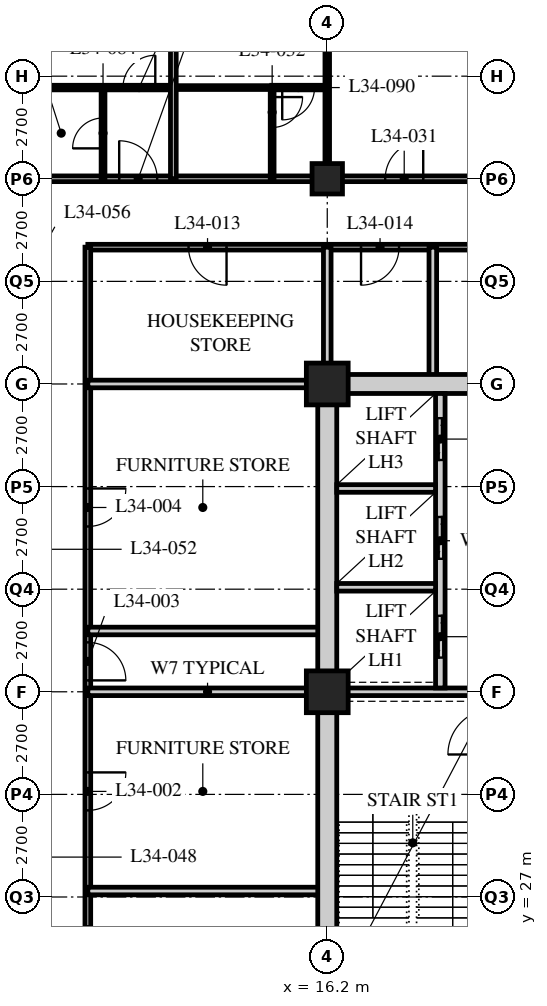
"""IFC4 building model, lengths in metres.
Left out: names, types, materials, properties, quantities, classifications, styles, units other than length and angle.
Written with IfcOpenShell. Run it as: python <this file> out.ifc"""

import sys

from ifc_helpers import new_model, si_unit, direction, frame, frame_2d, origin, origin_2d, place, context, subcontext, project, spatial, rectangle, hollow_rectangle, extrude, element, fill, save


model = new_model("IFC4")
c1 = context("Model", 3, precision=1e-05, world=origin(), true_north=direction((0.0, 1.0)))
c2 = subcontext(c1, "Body", "Model", "MODEL_VIEW")
j1 = project(units=[si_unit("LENGTHUNIT", "METRE"), si_unit("PLANEANGLEUNIT", "RADIAN")], contexts=[c1])
p1 = place(None, origin())
s1 = spatial("IfcSite", under=j1, at=p1, CompositionType="ELEMENT")
p2 = place(p1, origin())
s2 = spatial("IfcBuilding", under=s1, at=p2, CompositionType="ELEMENT")
p3 = place(p2, frame((0.0, 0.0, 134.0)))
s3 = spatial("IfcBuildingStorey", under=s2, at=p3, CompositionType="ELEMENT", Elevation=134.0)
for number, where, z_axis, x_axis in (
    (1, (16.2, 32.4, 0.0), (0.0, 0.0, 1.0), (1.0, 0.0, 0.0)),
    (2, (16.2, 40.5, 0.0), (0.0, 0.0, 1.0), (1.0, 0.0, 0.0)),
):
    element("IfcColumn", number, at=place(p3, frame(where, z_axis=z_axis, x_axis=x_axis)), inside=s3, PredefinedType="COLUMN", context=c2, shape_type="SweptSolid", body=[
        extrude(hollow_rectangle(XDim=1.1, YDim=1.1, WallThickness=0.1, at=origin_2d()), origin(), (0.0, 0.0, 1.0), 3.4),
    ])
p4 = place(p3, frame((16.2, 45.9, 0.0), z_axis=(0.0, 0.0, 1.0), x_axis=(1.0, 0.0, 0.0)))
e3 = element("IfcColumn", 3, at=p4, inside=s3, PredefinedType="COLUMN", context=c2, shape_type="SweptSolid", body=[
    extrude(hollow_rectangle(XDim=0.8, YDim=0.8, WallThickness=0.08, at=origin_2d()), origin(), (0.0, 0.0, 1.0), 3.4),
])
p5 = place(p3, frame((8.1, 45.9, 0.0), z_axis=(0.0, 0.0, 1.0), x_axis=(1.0, 0.0, 0.0)))
e4 = element("IfcWall", 4, at=p5, inside=s3, PredefinedType="PARTITIONING", context=c2, shape_type="SweptSolid", body=[
    extrude(rectangle(XDim=36.45, YDim=0.15, at=frame_2d((18.225, 0.0))), origin(), (0.0, 0.0, 1.0), 2.578),
])
p6 = place(p5, frame((9.625, 0.0, 0.0)))
e5 = element("IfcOpeningElement", 5, at=p6, cuts=e4, PredefinedType="OPENING", context=c2, shape_type="SweptSolid", body=[
    extrude(rectangle(XDim=1.0, YDim=2.1, at=frame_2d((0.5, 1.05))), frame((0.0, 0.085, 0.0), z_axis=(0.0, -1.0, 0.0), x_axis=(1.0, 0.0, 0.0)), (0.0, 0.0, 1.0), 0.17),
])
p7 = place(p5, frame((21.775, 0.0, 0.0)))
e6 = element("IfcOpeningElement", 6, at=p7, cuts=e4, PredefinedType="OPENING", context=c2, shape_type="SweptSolid", body=[
    extrude(rectangle(XDim=1.0, YDim=2.1, at=frame_2d((0.5, 1.05))), frame((0.0, 0.085, 0.0), z_axis=(0.0, -1.0, 0.0), x_axis=(1.0, 0.0, 0.0)), (0.0, 0.0, 1.0), 0.17),
])
p8 = place(p5, frame((28.95, 0.0, 0.0)))
e7 = element("IfcOpeningElement", 7, at=p8, cuts=e4, PredefinedType="OPENING", context=c2, shape_type="SweptSolid", body=[
    extrude(rectangle(XDim=1.0, YDim=2.1, at=frame_2d((0.5, 1.05))), frame((0.0, 0.085, 0.0), z_axis=(0.0, -1.0, 0.0), x_axis=(1.0, 0.0, 0.0)), (0.0, 0.0, 1.0), 0.17),
])
p9 = place(p5, frame((33.925, 0.0, 0.0)))
e8 = element("IfcOpeningElement", 8, at=p9, cuts=e4, PredefinedType="OPENING", context=c2, shape_type="SweptSolid", body=[
    extrude(rectangle(XDim=1.0, YDim=2.1, at=frame_2d((0.5, 1.05))), frame((0.0, 0.085, 0.0), z_axis=(0.0, -1.0, 0.0), x_axis=(1.0, 0.0, 0.0)), (0.0, 0.0, 1.0), 0.17),
])
p10 = place(p5, frame((2.625, 0.0, 0.0)))
e9 = element("IfcOpeningElement", 9, at=p10, cuts=e4, PredefinedType="OPENING", context=c2, shape_type="SweptSolid", body=[
    extrude(rectangle(XDim=1.0, YDim=2.1, at=frame_2d((0.5, 1.05))), frame((0.0, 0.085, 0.0), z_axis=(0.0, -1.0, 0.0), x_axis=(1.0, 0.0, 0.0)), (0.0, 0.0, 1.0), 0.17),
])
p11 = place(p3, frame((27.14, 44.1, 0.0), z_axis=(0.0, 0.0, 1.0), x_axis=(-1.0, 0.0, 0.0)))
e10 = element("IfcWall", 10, at=p11, inside=s3, PredefinedType="PARTITIONING", context=c2, shape_type="SweptSolid", body=[
    extrude(rectangle(XDim=17.24, YDim=0.15, at=frame_2d((8.62, 0.0))), origin(), (0.0, 0.0, 1.0), 3.19),
])
p12 = place(p11, frame((13.59, 0.0, 0.0)))
e11 = element("IfcOpeningElement", 11, at=p12, cuts=e10, PredefinedType="OPENING", context=c2, shape_type="SweptSolid", body=[
    extrude(rectangle(XDim=1.0, YDim=2.1, at=frame_2d((0.5, 1.05))), frame((0.0, 0.085, 0.0), z_axis=(0.0, -1.0, 0.0), x_axis=(1.0, 0.0, 0.0)), (0.0, 0.0, 1.0), 0.17),
])
p13 = place(p11, frame((9.051, 0.0, 0.0)))
e12 = element("IfcOpeningElement", 12, at=p13, cuts=e10, PredefinedType="OPENING", context=c2, shape_type="SweptSolid", body=[
    extrude(rectangle(XDim=1.0, YDim=2.1, at=frame_2d((0.5, 1.05))), frame((0.0, 0.085, 0.0), z_axis=(0.0, -1.0, 0.0), x_axis=(1.0, 0.0, 0.0)), (0.0, 0.0, 1.0), 0.17),
])
p14 = place(p11, frame((3.576, 0.0, 0.0)))
e13 = element("IfcOpeningElement", 13, at=p14, cuts=e10, PredefinedType="OPENING", context=c2, shape_type="SweptSolid", body=[
    extrude(rectangle(XDim=1.0, YDim=2.1, at=frame_2d((0.5, 1.05))), frame((0.0, 0.085, 0.0), z_axis=(0.0, -1.0, 0.0), x_axis=(1.0, 0.0, 0.0)), (0.0, 0.0, 1.0), 0.17),
])
p15 = place(p3, frame((9.9, 44.1, 0.0), z_axis=(0.0, 0.0, 1.0), x_axis=(0.0, -1.0, 0.0)))
e14 = element("IfcWall", 14, at=p15, inside=s3, PredefinedType="PARTITIONING", context=c2, shape_type="SweptSolid", body=[
    extrude(rectangle(XDim=24.75, YDim=0.15, at=frame_2d((12.375, 0.0))), origin(), (0.0, 0.0, 1.0), 3.19),
])
p16 = place(p15, frame((17.871, 0.0, 0.0)))
e15 = element("IfcOpeningElement", 15, at=p16, cuts=e14, PredefinedType="OPENING", context=c2, shape_type="SweptSolid", body=[
    extrude(rectangle(XDim=1.0, YDim=2.1, at=frame_2d((0.5, 1.05))), frame((0.0, 0.085, 0.0), z_axis=(0.0, -1.0, 0.0), x_axis=(1.0, 0.0, 0.0)), (0.0, 0.0, 1.0), 0.17),
])
p17 = place(p15, frame((13.821, 0.0, 0.0)))
e16 = element("IfcOpeningElement", 16, at=p17, cuts=e14, PredefinedType="OPENING", context=c2, shape_type="SweptSolid", body=[
    extrude(rectangle(XDim=1.0, YDim=2.1, at=frame_2d((0.5, 1.05))), frame((0.0, 0.085, 0.0), z_axis=(0.0, -1.0, 0.0), x_axis=(1.0, 0.0, 0.0)), (0.0, 0.0, 1.0), 0.17),
])
p18 = place(p15, frame((10.4, 0.0, 0.0)))
e17 = element("IfcOpeningElement", 17, at=p18, cuts=e14, PredefinedType="OPENING", context=c2, shape_type="SweptSolid", body=[
    extrude(rectangle(XDim=1.0, YDim=2.1, at=frame_2d((0.5, 1.05))), frame((0.0, 0.085, 0.0), z_axis=(0.0, -1.0, 0.0), x_axis=(1.0, 0.0, 0.0)), (0.0, 0.0, 1.0), 0.17),
])
p19 = place(p15, frame((6.35, 0.0, 0.0)))
e18 = element("IfcOpeningElement", 18, at=p19, cuts=e14, PredefinedType="OPENING", context=c2, shape_type="SweptSolid", body=[
    extrude(rectangle(XDim=1.0, YDim=2.1, at=frame_2d((0.5, 1.05))), frame((0.0, 0.085, 0.0), z_axis=(0.0, -1.0, 0.0), x_axis=(1.0, 0.0, 0.0)), (0.0, 0.0, 1.0), 0.17),
])
for number, where, z_axis, x_axis in (
    (19, (9.9, 32.4, 0.0), (0.0, 0.0, 1.0), (1.0, 0.0, 0.0)),
    (20, (9.9, 27.157, 0.0), (0.0, 0.0, 1.0), (1.0, 0.0, 0.0)),
    (21, (9.9, 34.0, 0.0), (0.0, 0.0, 1.0), (1.0, 0.0, 0.0)),
):
    element("IfcWall", number, at=place(p3, frame(where, z_axis=z_axis, x_axis=x_axis)), inside=s3, PredefinedType="SOLIDWALL", context=c2, shape_type="SweptSolid", body=[
        extrude(rectangle(XDim=6.3, YDim=0.2, at=frame_2d((3.15, 0.0))), origin(), (0.0, 0.0, 1.0), 3.19),
    ])
p20 = place(p3, frame((16.2, 40.5, 0.0), z_axis=(0.0, 0.0, 1.0), x_axis=(0.0, 1.0, 0.0)))
e22 = element("IfcWall", 22, at=p20, inside=s3, PredefinedType="SOLIDWALL", context=c2, shape_type="SweptSolid", body=[
    extrude(rectangle(XDim=3.6, YDim=0.2, at=frame_2d((1.8, 0.0))), origin(), (0.0, 0.0, 1.0), 2.578),
])
p21 = place(p3, frame((18.978, 44.1, 0.0), z_axis=(0.0, 0.0, 1.0), x_axis=(0.0, -1.0, 0.0)))
e23 = element("IfcWall", 23, at=p21, inside=s3, PredefinedType="SOLIDWALL", context=c2, shape_type="SweptSolid", body=[
    extrude(rectangle(XDim=3.6, YDim=0.2, at=frame_2d((1.8, 0.0))), origin(), (0.0, 0.0, 1.0), 3.19),
])
p22 = place(p3, frame((9.9, 40.5, 0.0), z_axis=(0.0, 0.0, 1.0), x_axis=(1.0, 0.0, 0.0)))
e24 = element("IfcWall", 24, at=p22, inside=s3, PredefinedType="SOLIDWALL", context=c2, shape_type="SweptSolid", body=[
    extrude(rectangle(XDim=6.3, YDim=0.2, at=frame_2d((3.15, 0.0))), origin(), (0.0, 0.0, 1.0), 3.19),
])
p23 = place(p3, frame((12.15, 48.3, 0.0), z_axis=(0.0, 0.0, 1.0), x_axis=(1.0, 0.0, 0.0)))
e25 = element("IfcWall", 25, at=p23, inside=s3, PredefinedType="PARTITIONING", context=c2, shape_type="SweptSolid", body=[
    extrude(rectangle(XDim=2.6, YDim=0.1, at=frame_2d((1.3, 0.0))), origin(), (0.0, 0.0, 1.0), 3.19),
])
p24 = place(p3, frame((14.75, 45.9, 0.0), z_axis=(0.0, 0.0, 1.0), x_axis=(0.0, 1.0, 0.0)))
e26 = element("IfcWall", 26, at=p24, inside=s3, PredefinedType="PARTITIONING", context=c2, shape_type="SweptSolid", body=[
    extrude(rectangle(XDim=2.4, YDim=0.1, at=frame_2d((1.2, 0.0))), origin(), (0.0, 0.0, 1.0), 3.19),
])
p25 = place(p24, frame((1.35, 0.0, 0.0)))
e27 = element("IfcOpeningElement", 27, at=p25, cuts=e26, PredefinedType="OPENING", context=c2, shape_type="SweptSolid", body=[
    extrude(rectangle(XDim=0.8, YDim=2.1, at=frame_2d((0.4, 1.05))), frame((0.0, 0.06, 0.0), z_axis=(0.0, -1.0, 0.0), x_axis=(1.0, 0.0, 0.0)), (0.0, 0.0, 1.0), 0.12),
])
p26 = place(p3, frame((16.2, 45.9, 0.0), z_axis=(0.0, 0.0, 1.0), x_axis=(0.0, 1.0, 0.0)))
e28 = element("IfcWall", 28, at=p26, inside=s3, PredefinedType="PARTITIONING", context=c2, shape_type="SweptSolid", body=[
    extrude(rectangle(XDim=7.8, YDim=0.12, at=frame_2d((3.9, 0.0))), origin(), (0.0, 0.0, 1.0), 2.578),
])
p27 = place(p26, frame((4.825, 0.0, 0.0)))
e29 = element("IfcOpeningElement", 29, at=p27, cuts=e28, PredefinedType="OPENING", context=c2, shape_type="SweptSolid", body=[
    extrude(rectangle(XDim=0.85, YDim=2.1, at=frame_2d((0.425, 1.05))), frame((0.0, 0.07, 0.0), z_axis=(0.0, -1.0, 0.0), x_axis=(1.0, 0.0, 0.0)), (0.0, 0.0, 1.0), 0.14),
])
p28 = place(p3, frame((8.1, 48.3, 0.0), z_axis=(0.0, 0.0, 1.0), x_axis=(1.0, 0.0, 0.0)))
e30 = element("IfcWall", 30, at=p28, inside=s3, PredefinedType="PARTITIONING", context=c2, shape_type="SweptSolid", body=[
    extrude(rectangle(XDim=4.05, YDim=0.12, at=frame_2d((2.025, 0.0))), origin(), (0.0, 0.0, 1.0), 3.19),
])
p29 = place(p28, frame((2.725, 0.0, 0.0)))
e31 = element("IfcOpeningElement", 31, at=p29, cuts=e30, PredefinedType="OPENING", context=c2, shape_type="SweptSolid", body=[
    extrude(rectangle(XDim=0.85, YDim=2.1, at=frame_2d((0.425, 1.05))), frame((0.0, 0.07, 0.0), z_axis=(0.0, -1.0, 0.0), x_axis=(1.0, 0.0, 0.0)), (0.0, 0.0, 1.0), 0.14),
])
p30 = place(p3, frame((10.3, 45.9, 0.0), z_axis=(0.0, 0.0, 1.0), x_axis=(0.0, 1.0, 0.0)))
e32 = element("IfcWall", 32, at=p30, inside=s3, PredefinedType="PARTITIONING", context=c2, shape_type="SweptSolid", body=[
    extrude(rectangle(XDim=2.4, YDim=0.1, at=frame_2d((1.2, 0.0))), origin(), (0.0, 0.0, 1.0), 3.19),
])
p31 = place(p30, frame((0.8, 0.0, 0.0)))
e33 = element("IfcOpeningElement", 33, at=p31, cuts=e32, PredefinedType="OPENING", context=c2, shape_type="SweptSolid", body=[
    extrude(rectangle(XDim=0.8, YDim=2.1, at=frame_2d((0.4, 1.05))), frame((0.0, 0.06, 0.0), z_axis=(0.0, -1.0, 0.0), x_axis=(1.0, 0.0, 0.0)), (0.0, 0.0, 1.0), 0.12),
])
p32 = place(p3, frame((12.15, 45.9, 0.0), z_axis=(0.0, 0.0, 1.0), x_axis=(0.0, 1.0, 0.0)))
e34 = element("IfcWall", 34, at=p32, inside=s3, PredefinedType="PARTITIONING", context=c2, shape_type="SweptSolid", body=[
    extrude(rectangle(XDim=7.8, YDim=0.15, at=frame_2d((3.9, 0.0))), origin(), (0.0, 0.0, 1.0), 3.19),
])
p33 = place(p3, frame((14.74, 48.3, 0.0), z_axis=(0.0, 0.0, 1.0), x_axis=(1.0, 0.0, 0.0)))
e35 = element("IfcWall", 35, at=p33, inside=s3, PredefinedType="PARTITIONING", context=c2, shape_type="SweptSolid", body=[
    extrude(rectangle(XDim=1.46, YDim=0.12, at=frame_2d((0.73, 0.0))), origin(), (0.0, 0.0, 1.0), 3.19),
])
p34 = place(p33, frame((0.275, 0.0, 0.0)))
e36 = element("IfcOpeningElement", 36, at=p34, cuts=e35, PredefinedType="OPENING", context=c2, shape_type="SweptSolid", body=[
    extrude(rectangle(XDim=0.85, YDim=2.1, at=frame_2d((0.425, 1.05))), frame((0.0, 0.07, 0.0), z_axis=(0.0, -1.0, 0.0), x_axis=(1.0, 0.0, 0.0)), (0.0, 0.0, 1.0), 0.14),
])
p35 = place(p3, frame((15.95, 40.5, 0.0), z_axis=(0.0, 0.0, 1.0), x_axis=(1.0, 0.0, 0.0)))
e37 = element("IfcWall", 37, at=p35, inside=s3, PredefinedType="SOLIDWALL", context=c2, shape_type="SweptSolid", body=[
    extrude(rectangle(XDim=24.8, YDim=0.5, at=frame_2d((12.4, 0.0))), origin(), (0.0, 0.0, 1.0), 2.54),
])
p36 = place(p35, frame((11.5, 0.0, 0.0)))
e38 = element("IfcOpeningElement", 38, at=p36, cuts=e37, PredefinedType="OPENING", context=c2, shape_type="SweptSolid", body=[
    extrude(rectangle(XDim=1.8, YDim=2.4, at=frame_2d((0.9, 1.2))), frame((0.0, 0.26, 0.0), z_axis=(0.0, -1.0, 0.0), x_axis=(1.0, 0.0, 0.0)), (0.0, 0.0, 1.0), 0.52),
])
p37 = place(p3, frame((16.2, 24.55, 0.0), z_axis=(0.0, 0.0, 1.0), x_axis=(0.0, 1.0, 0.0)))
e39 = element("IfcWall", 39, at=p37, inside=s3, PredefinedType="SOLIDWALL", context=c2, shape_type="SweptSolid", body=[
    extrude(rectangle(XDim=15.7, YDim=0.5, at=frame_2d((7.85, 0.0))), origin(), (0.0, 0.0, 1.0), 2.578),
])
p38 = place(p3, frame((16.45, 32.4, 0.0), z_axis=(0.0, 0.0, 1.0), x_axis=(1.0, 0.0, 0.0)))
e40 = element("IfcWall", 40, at=p38, inside=s3, PredefinedType="SOLIDWALL", context=c2, shape_type="SweptSolid", body=[
    extrude(rectangle(XDim=7.95, YDim=0.2, at=frame_2d((3.975, 0.0))), origin(), (0.0, 0.0, 1.0), 2.578),
])
p39 = place(p3, frame((19.175, 32.5, 0.0), z_axis=(0.0, 0.0, 1.0), x_axis=(0.0, 1.0, 0.0)))
e41 = element("IfcWall", 41, at=p39, inside=s3, PredefinedType="SOLIDWALL", context=c2, shape_type="SweptSolid", body=[
    extrude(rectangle(XDim=7.75, YDim=0.25, at=frame_2d((3.875, 0.0))), origin(), (0.0, 0.0, 1.0), 3.19),
])
p40 = place(p39, frame((0.8, 0.0, 0.0)))
e42 = element("IfcOpeningElement", 42, at=p40, cuts=e41, PredefinedType="OPENING", context=c2, shape_type="SweptSolid", body=[
    extrude(rectangle(XDim=1.1, YDim=2.4, at=frame_2d((0.55, 1.2))), frame((0.0, 0.135, 0.0), z_axis=(0.0, -1.0, 0.0), x_axis=(1.0, 0.0, 0.0)), (0.0, 0.0, 1.0), 0.27),
])
p41 = place(p39, frame((3.4, 0.0, 0.0)))
e43 = element("IfcOpeningElement", 43, at=p41, cuts=e41, PredefinedType="OPENING", context=c2, shape_type="SweptSolid", body=[
    extrude(rectangle(XDim=1.1, YDim=2.4, at=frame_2d((0.55, 1.2))), frame((0.0, 0.135, 0.0), z_axis=(0.0, -1.0, 0.0), x_axis=(1.0, 0.0, 0.0)), (0.0, 0.0, 1.0), 0.27),
])
p42 = place(p39, frame((6.0, 0.0, 0.0)))
e44 = element("IfcOpeningElement", 44, at=p42, cuts=e41, PredefinedType="OPENING", context=c2, shape_type="SweptSolid", body=[
    extrude(rectangle(XDim=1.1, YDim=2.4, at=frame_2d((0.55, 1.2))), frame((0.0, 0.135, 0.0), z_axis=(0.0, -1.0, 0.0), x_axis=(1.0, 0.0, 0.0)), (0.0, 0.0, 1.0), 0.27),
])
for number, where, z_axis, x_axis in (
    (45, (16.45, 35.15, 0.0), (0.0, 0.0, 1.0), (1.0, 0.0, 0.0)),
    (46, (16.45, 37.75, 0.0), (0.0, 0.0, 1.0), (1.0, 0.0, 0.0)),
):
    element("IfcWall", number, at=place(p3, frame(where, z_axis=z_axis, x_axis=x_axis)), inside=s3, PredefinedType="SOLIDWALL", context=c2, shape_type="SweptSolid", body=[
        extrude(rectangle(XDim=2.6, YDim=0.2, at=frame_2d((1.3, 0.0))), origin(), (0.0, 0.0, 1.0), 3.19),
    ])
p43 = place(p17, origin())
e47 = element("IfcDoor", 47, at=p43, inside=s3, OperationType="SINGLE_SWING_LEFT", PredefinedType="DOOR", context=c2, shape_type="SweptSolid", body=[
    extrude(rectangle(XDim=1.0, YDim=2.1, at=frame_2d((0.5, 1.05))), frame((0.0, 0.025, 0.0), z_axis=(0.0, -1.0, 0.0), x_axis=(1.0, 0.0, 0.0)), (0.0, 0.0, 1.0), 0.05),
])
fill(e16, e47)
p44 = place(p18, origin())
e48 = element("IfcDoor", 48, at=p44, inside=s3, OperationType="SINGLE_SWING_RIGHT", PredefinedType="DOOR", context=c2, shape_type="SweptSolid", body=[
    extrude(rectangle(XDim=1.0, YDim=2.1, at=frame_2d((0.5, 1.05))), frame((0.0, 0.025, 0.0), z_axis=(0.0, -1.0, 0.0), x_axis=(1.0, 0.0, 0.0)), (0.0, 0.0, 1.0), 0.05),
])
fill(e17, e48)
p45 = place(p19, origin())
e49 = element("IfcDoor", 49, at=p45, inside=s3, OperationType="SINGLE_SWING_LEFT", PredefinedType="DOOR", context=c2, shape_type="SweptSolid", body=[
    extrude(rectangle(XDim=1.0, YDim=2.1, at=frame_2d((0.5, 1.05))), frame((0.0, 0.025, 0.0), z_axis=(0.0, -1.0, 0.0), x_axis=(1.0, 0.0, 0.0)), (0.0, 0.0, 1.0), 0.05),
])
fill(e18, e49)
p46 = place(p12, origin())
e50 = element("IfcDoor", 50, at=p46, inside=s3, OperationType="SINGLE_SWING_LEFT", PredefinedType="DOOR", context=c2, shape_type="SweptSolid", body=[
    extrude(rectangle(XDim=1.0, YDim=2.1, at=frame_2d((0.5, 1.05))), frame((0.0, 0.025, 0.0), z_axis=(0.0, -1.0, 0.0), x_axis=(1.0, 0.0, 0.0)), (0.0, 0.0, 1.0), 0.05),
])
fill(e11, e50)
p47 = place(p13, origin())
e51 = element("IfcDoor", 51, at=p47, inside=s3, OperationType="SINGLE_SWING_RIGHT", PredefinedType="DOOR", context=c2, shape_type="SweptSolid", body=[
    extrude(rectangle(XDim=1.0, YDim=2.1, at=frame_2d((0.5, 1.05))), frame((0.0, 0.025, 0.0), z_axis=(0.0, -1.0, 0.0), x_axis=(1.0, 0.0, 0.0)), (0.0, 0.0, 1.0), 0.05),
])
fill(e12, e51)
p48 = place(p6, origin())
e52 = element("IfcDoor", 52, at=p48, inside=s3, OperationType="SINGLE_SWING_RIGHT", PredefinedType="DOOR", context=c2, shape_type="SweptSolid", body=[
    extrude(rectangle(XDim=1.0, YDim=2.1, at=frame_2d((0.5, 1.05))), frame((0.0, 0.025, 0.0), z_axis=(0.0, -1.0, 0.0), x_axis=(1.0, 0.0, 0.0)), (0.0, 0.0, 1.0), 0.05),
])
fill(e5, e52)
p49 = place(p25, origin())
e53 = element("IfcDoor", 53, at=p49, inside=s3, OperationType="SINGLE_SWING_LEFT", PredefinedType="DOOR", context=c2, shape_type="SweptSolid", body=[
    extrude(rectangle(XDim=0.8, YDim=2.1, at=frame_2d((0.4, 1.05))), frame((0.0, 0.025, 0.0), z_axis=(0.0, -1.0, 0.0), x_axis=(1.0, 0.0, 0.0)), (0.0, 0.0, 1.0), 0.05),
])
fill(e27, e53)
p50 = place(p31, origin())
e54 = element("IfcDoor", 54, at=p50, inside=s3, OperationType="SINGLE_SWING_LEFT", PredefinedType="DOOR", context=c2, shape_type="SweptSolid", body=[
    extrude(rectangle(XDim=0.8, YDim=2.1, at=frame_2d((0.4, 1.05))), frame((0.0, 0.025, 0.0), z_axis=(0.0, -1.0, 0.0), x_axis=(1.0, 0.0, 0.0)), (0.0, 0.0, 1.0), 0.05),
])
fill(e33, e54)
p51 = place(p10, origin())
e55 = element("IfcDoor", 55, at=p51, inside=s3, OperationType="SINGLE_SWING_LEFT", PredefinedType="DOOR", context=c2, shape_type="SweptSolid", body=[
    extrude(rectangle(XDim=1.0, YDim=2.1, at=frame_2d((0.5, 1.05))), frame((0.0, 0.025, 0.0), z_axis=(0.0, -1.0, 0.0), x_axis=(1.0, 0.0, 0.0)), (0.0, 0.0, 1.0), 0.05),
])
fill(e9, e55)
p52 = place(p29, origin())
e56 = element("IfcDoor", 56, at=p52, inside=s3, OperationType="SINGLE_SWING_RIGHT", PredefinedType="DOOR", context=c2, shape_type="SweptSolid", body=[
    extrude(rectangle(XDim=0.85, YDim=2.1, at=frame_2d((0.425, 1.05))), frame((0.0, 0.025, 0.0), z_axis=(0.0, -1.0, 0.0), x_axis=(1.0, 0.0, 0.0)), (0.0, 0.0, 1.0), 0.05),
])
fill(e31, e56)
p53 = place(p34, origin())
e57 = element("IfcDoor", 57, at=p53, inside=s3, OperationType="SINGLE_SWING_RIGHT", PredefinedType="DOOR", context=c2, shape_type="SweptSolid", body=[
    extrude(rectangle(XDim=0.85, YDim=2.1, at=frame_2d((0.425, 1.05))), frame((0.0, 0.025, 0.0), z_axis=(0.0, -1.0, 0.0), x_axis=(1.0, 0.0, 0.0)), (0.0, 0.0, 1.0), 0.05),
])
fill(e36, e57)
p54 = place(p40, origin())
e58 = element("IfcDoor", 58, at=p54, inside=s3, OperationType="DOUBLE_DOOR_SLIDING", PredefinedType="DOOR", context=c2, shape_type="SweptSolid", body=[
    extrude(rectangle(XDim=1.1, YDim=2.4, at=frame_2d((0.55, 1.2))), frame((0.0, 0.025, 0.0), z_axis=(0.0, -1.0, 0.0), x_axis=(1.0, 0.0, 0.0)), (0.0, 0.0, 1.0), 0.05),
])
fill(e42, e58)
p55 = place(p41, origin())
e59 = element("IfcDoor", 59, at=p55, inside=s3, OperationType="DOUBLE_DOOR_SLIDING", PredefinedType="DOOR", context=c2, shape_type="SweptSolid", body=[
    extrude(rectangle(XDim=1.1, YDim=2.4, at=frame_2d((0.55, 1.2))), frame((0.0, 0.025, 0.0), z_axis=(0.0, -1.0, 0.0), x_axis=(1.0, 0.0, 0.0)), (0.0, 0.0, 1.0), 0.05),
])
fill(e43, e59)
p56 = place(p42, origin())
e60 = element("IfcDoor", 60, at=p56, inside=s3, OperationType="DOUBLE_DOOR_SLIDING", PredefinedType="DOOR", context=c2, shape_type="SweptSolid", body=[
    extrude(rectangle(XDim=1.1, YDim=2.4, at=frame_2d((0.55, 1.2))), frame((0.0, 0.025, 0.0), z_axis=(0.0, -1.0, 0.0), x_axis=(1.0, 0.0, 0.0)), (0.0, 0.0, 1.0), 0.05),
])
fill(e44, e60)
save(model, sys.argv[1])
